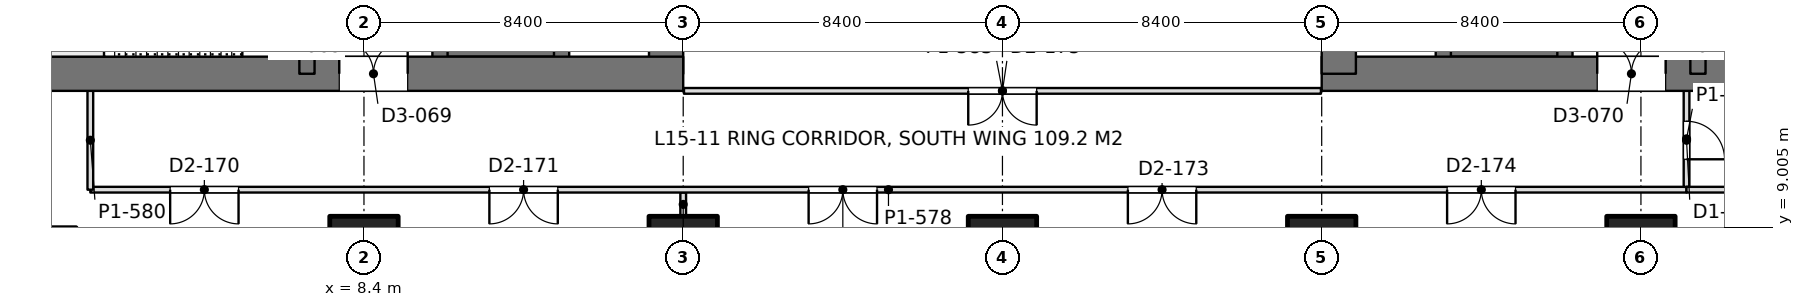
"""IFC4 building model, lengths in metres.
Left out: names, types, materials, properties, quantities, classifications, styles, units other than length and angle.
Written with IfcOpenShell. Run it as: python <this file> out.ifc"""

import sys

from ifc_helpers import new_model, si_unit, direction, frame, frame_2d, origin, origin_2d, place, context, subcontext, project, spatial, rectangle, extrude, element, fill, save


model = new_model("IFC4")
c1 = context("Model", 3, precision=1e-05, world=origin(), true_north=direction((0.0, 1.0)))
c2 = subcontext(c1, "Body", "Model", "MODEL_VIEW")
j1 = project(units=[si_unit("LENGTHUNIT", "METRE"), si_unit("PLANEANGLEUNIT", "RADIAN")], contexts=[c1])
p1 = place(None, origin())
s1 = spatial("IfcSite", under=j1, at=p1, CompositionType="ELEMENT")
p2 = place(p1, origin())
s2 = spatial("IfcBuilding", under=s1, at=p2, CompositionType="ELEMENT")
p3 = place(p2, frame((0.0, 0.0, 68.4)))
s3 = spatial("IfcBuildingStorey", under=s2, at=p3, CompositionType="ELEMENT", Elevation=68.4)
for number, where, z_axis, x_axis in (
    (1, (8.4, 8.4, 0.0), (0.0, 0.0, 1.0), (1.0, 0.0, 0.0)),
    (2, (16.8, 8.4, 0.0), (0.0, 0.0, 1.0), (1.0, 0.0, 0.0)),
    (3, (25.2, 8.4, 0.0), (0.0, 0.0, 1.0), (1.0, 0.0, 0.0)),
    (4, (33.6, 8.4, 0.0), (0.0, 0.0, 1.0), (1.0, 0.0, 0.0)),
    (5, (42.0, 8.4, 0.0), (0.0, 0.0, 1.0), (1.0, 0.0, 0.0)),
):
    element("IfcColumn", number, at=place(p3, frame(where, z_axis=z_axis, x_axis=x_axis)), inside=s3, PredefinedType="COLUMN", context=c2, shape_type="SweptSolid", body=[
        extrude(rectangle(XDim=1.8, YDim=1.8, at=origin_2d()), origin(), (0.0, 0.0, 1.0), 4.5),
    ])
p4 = place(p3, frame((-1.2, 13.05, 0.0), z_axis=(0.0, 0.0, 1.0), x_axis=(1.0, 0.0, 0.0)))
e6 = element("IfcWall", 6, at=p4, inside=s3, PredefinedType="SHEAR", context=c2, shape_type="SweptSolid", body=[
    extrude(rectangle(XDim=18.0, YDim=0.9, at=frame_2d((9.0, 0.0))), origin(), (0.0, 0.0, 1.0), 4.5),
])
p5 = place(p4, frame((8.95, 0.0, 0.0)))
e7 = element("IfcOpeningElement", 7, at=p5, cuts=e6, PredefinedType="OPENING", context=c2, shape_type="SweptSolid", body=[
    extrude(rectangle(XDim=1.8, YDim=2.4, at=frame_2d((0.9, 1.2))), frame((0.0, 0.46, 0.0), z_axis=(0.0, -1.0, 0.0), x_axis=(1.0, 0.0, 0.0)), (0.0, 0.0, 1.0), 0.92),
])
p6 = place(p3, frame((16.35, 13.05, 0.0), z_axis=(0.0, 0.0, 1.0), x_axis=(0.0, 1.0, 0.0)))
e8 = element("IfcWall", 8, at=p6, inside=s3, PredefinedType="SHEAR", context=c2, shape_type="SweptSolid", body=[
    extrude(rectangle(XDim=24.3, YDim=0.9, at=frame_2d((12.15, 0.0))), origin(), (0.0, 0.0, 1.0), 4.5),
])
p7 = place(p3, frame((6.9, 13.05, 0.0), z_axis=(0.0, 0.0, 1.0), x_axis=(0.0, 1.0, 0.0)))
e9 = element("IfcWall", 9, at=p7, inside=s3, PredefinedType="SHEAR", context=c2, shape_type="SweptSolid", body=[
    extrude(rectangle(XDim=24.3, YDim=0.4, at=frame_2d((12.15, 0.0))), origin(), (0.0, 0.0, 1.0), 4.5),
])
p8 = place(p7, frame((1.3, 0.0, 0.0)))
e10 = element("IfcOpeningElement", 10, at=p8, cuts=e9, PredefinedType="OPENING", context=c2, shape_type="SweptSolid", body=[
    extrude(rectangle(XDim=1.0, YDim=2.2, at=frame_2d((0.5, 1.1))), frame((0.0, 0.21, 0.0), z_axis=(0.0, -1.0, 0.0), x_axis=(1.0, 0.0, 0.0)), (0.0, 0.0, 1.0), 0.42),
])
p9 = place(p7, frame((22.0, 0.0, 0.0)))
e11 = element("IfcOpeningElement", 11, at=p9, cuts=e9, PredefinedType="OPENING", context=c2, shape_type="SweptSolid", body=[
    extrude(rectangle(XDim=1.0, YDim=2.2, at=frame_2d((0.5, 1.1))), frame((0.0, 0.21, 0.0), z_axis=(0.0, -1.0, 0.0), x_axis=(1.0, 0.0, 0.0)), (0.0, 0.0, 1.0), 0.42),
])
p10 = place(p7, frame((5.55, 0.0, 0.0)))
e12 = element("IfcOpeningElement", 12, at=p10, cuts=e9, PredefinedType="OPENING", context=c2, shape_type="SweptSolid", body=[
    extrude(rectangle(XDim=1.0, YDim=2.2, at=frame_2d((0.5, 1.1))), frame((0.0, 0.21, 0.0), z_axis=(0.0, -1.0, 0.0), x_axis=(1.0, 0.0, 0.0)), (0.0, 0.0, 1.0), 0.42),
])
p11 = place(p7, frame((9.55, 0.0, 0.0)))
e13 = element("IfcOpeningElement", 13, at=p11, cuts=e9, PredefinedType="OPENING", context=c2, shape_type="SweptSolid", body=[
    extrude(rectangle(XDim=1.0, YDim=2.2, at=frame_2d((0.5, 1.1))), frame((0.0, 0.21, 0.0), z_axis=(0.0, -1.0, 0.0), x_axis=(1.0, 0.0, 0.0)), (0.0, 0.0, 1.0), 0.42),
])
p12 = place(p7, frame((12.8, 0.0, 0.0)))
e14 = element("IfcOpeningElement", 14, at=p12, cuts=e9, PredefinedType="OPENING", context=c2, shape_type="SweptSolid", body=[
    extrude(rectangle(XDim=1.1, YDim=2.2, at=frame_2d((0.55, 1.1))), frame((0.0, 0.21, 0.0), z_axis=(0.0, -1.0, 0.0), x_axis=(1.0, 0.0, 0.0)), (0.0, 0.0, 1.0), 0.42),
])
p13 = place(p7, frame((15.538, 0.0, 0.0)))
e15 = element("IfcOpeningElement", 15, at=p13, cuts=e9, PredefinedType="OPENING", context=c2, shape_type="SweptSolid", body=[
    extrude(rectangle(XDim=1.1, YDim=2.2, at=frame_2d((0.55, 1.1))), frame((0.0, 0.21, 0.0), z_axis=(0.0, -1.0, 0.0), x_axis=(1.0, 0.0, 0.0)), (0.0, 0.0, 1.0), 0.42),
])
p14 = place(p7, frame((18.262, 0.0, 0.0)))
e16 = element("IfcOpeningElement", 16, at=p14, cuts=e9, PredefinedType="OPENING", context=c2, shape_type="SweptSolid", body=[
    extrude(rectangle(XDim=1.1, YDim=2.2, at=frame_2d((0.55, 1.1))), frame((0.0, 0.21, 0.0), z_axis=(0.0, -1.0, 0.0), x_axis=(1.0, 0.0, 0.0)), (0.0, 0.0, 1.0), 0.42),
])
p15 = place(p3, frame((10.4, 13.05, 0.0), z_axis=(0.0, 0.0, 1.0), x_axis=(0.0, 1.0, 0.0)))
e17 = element("IfcWall", 17, at=p15, inside=s3, PredefinedType="SHEAR", context=c2, shape_type="SweptSolid", body=[
    extrude(rectangle(XDim=24.3, YDim=0.4, at=frame_2d((12.15, 0.0))), origin(), (0.0, 0.0, 1.0), 4.5),
])
p16 = place(p15, frame((1.5, 0.0, 0.0)))
e18 = element("IfcOpeningElement", 18, at=p16, cuts=e17, PredefinedType="OPENING", context=c2, shape_type="SweptSolid", body=[
    extrude(rectangle(XDim=1.1, YDim=2.2, at=frame_2d((0.55, 1.1))), frame((0.0, 0.21, 0.0), z_axis=(0.0, -1.0, 0.0), x_axis=(1.0, 0.0, 0.0)), (0.0, 0.0, 1.0), 0.42),
])
p17 = place(p15, frame((4.35, 0.0, 0.0)))
e19 = element("IfcOpeningElement", 19, at=p17, cuts=e17, PredefinedType="OPENING", context=c2, shape_type="SweptSolid", body=[
    extrude(rectangle(XDim=1.1, YDim=2.2, at=frame_2d((0.55, 1.1))), frame((0.0, 0.21, 0.0), z_axis=(0.0, -1.0, 0.0), x_axis=(1.0, 0.0, 0.0)), (0.0, 0.0, 1.0), 0.42),
])
p18 = place(p15, frame((7.2, 0.0, 0.0)))
e20 = element("IfcOpeningElement", 20, at=p18, cuts=e17, PredefinedType="OPENING", context=c2, shape_type="SweptSolid", body=[
    extrude(rectangle(XDim=1.1, YDim=2.2, at=frame_2d((0.55, 1.1))), frame((0.0, 0.21, 0.0), z_axis=(0.0, -1.0, 0.0), x_axis=(1.0, 0.0, 0.0)), (0.0, 0.0, 1.0), 0.42),
])
p19 = place(p15, frame((21.45, 0.0, 0.0)))
e21 = element("IfcOpeningElement", 21, at=p19, cuts=e17, PredefinedType="OPENING", context=c2, shape_type="SweptSolid", body=[
    extrude(rectangle(XDim=1.1, YDim=2.2, at=frame_2d((0.55, 1.1))), frame((0.0, 0.21, 0.0), z_axis=(0.0, -1.0, 0.0), x_axis=(1.0, 0.0, 0.0)), (0.0, 0.0, 1.0), 0.42),
])
p20 = place(p3, frame((13.6, 13.05, 0.0), z_axis=(0.0, 0.0, 1.0), x_axis=(0.0, 1.0, 0.0)))
e22 = element("IfcWall", 22, at=p20, inside=s3, PredefinedType="SHEAR", context=c2, shape_type="SweptSolid", body=[
    extrude(rectangle(XDim=24.3, YDim=0.4, at=frame_2d((12.15, 0.0))), origin(), (0.0, 0.0, 1.0), 4.5),
])
p21 = place(p3, frame((10.4, 13.65, 0.0), z_axis=(0.0, 0.0, 1.0), x_axis=(1.0, 0.0, 0.0)))
e23 = element("IfcWall", 23, at=p21, inside=s3, PredefinedType="SHEAR", context=c2, shape_type="SweptSolid", body=[
    extrude(rectangle(XDim=3.2, YDim=0.3, at=frame_2d((1.6, 0.0))), origin(), (0.0, 0.0, 1.0), 4.5),
])
p22 = place(p3, frame((33.6, 13.05, 0.0), z_axis=(0.0, 0.0, 1.0), x_axis=(1.0, 0.0, 0.0)))
e24 = element("IfcWall", 24, at=p22, inside=s3, PredefinedType="SHEAR", context=c2, shape_type="SweptSolid", body=[
    extrude(rectangle(XDim=18.0, YDim=0.9, at=frame_2d((9.0, 0.0))), origin(), (0.0, 0.0, 1.0), 4.5),
])
p23 = place(p22, frame((7.25, 0.0, 0.0)))
e25 = element("IfcOpeningElement", 25, at=p23, cuts=e24, PredefinedType="OPENING", context=c2, shape_type="SweptSolid", body=[
    extrude(rectangle(XDim=1.8, YDim=2.4, at=frame_2d((0.9, 1.2))), frame((0.0, 0.46, 0.0), z_axis=(0.0, -1.0, 0.0), x_axis=(1.0, 0.0, 0.0)), (0.0, 0.0, 1.0), 0.92),
])
p24 = place(p3, frame((34.05, 13.05, 0.0), z_axis=(0.0, 0.0, 1.0), x_axis=(0.0, 1.0, 0.0)))
e26 = element("IfcWall", 26, at=p24, inside=s3, PredefinedType="SHEAR", context=c2, shape_type="SweptSolid", body=[
    extrude(rectangle(XDim=24.3, YDim=0.9, at=frame_2d((12.15, 0.0))), origin(), (0.0, 0.0, 1.0), 4.5),
])
p25 = place(p3, frame((43.5, 13.05, 0.0), z_axis=(0.0, 0.0, 1.0), x_axis=(0.0, 1.0, 0.0)))
e27 = element("IfcWall", 27, at=p25, inside=s3, PredefinedType="SHEAR", context=c2, shape_type="SweptSolid", body=[
    extrude(rectangle(XDim=24.3, YDim=0.4, at=frame_2d((12.15, 0.0))), origin(), (0.0, 0.0, 1.0), 4.5),
])
p26 = place(p25, frame((1.3, 0.0, 0.0)))
e28 = element("IfcOpeningElement", 28, at=p26, cuts=e27, PredefinedType="OPENING", context=c2, shape_type="SweptSolid", body=[
    extrude(rectangle(XDim=1.0, YDim=2.2, at=frame_2d((0.5, 1.1))), frame((0.0, 0.21, 0.0), z_axis=(0.0, -1.0, 0.0), x_axis=(1.0, 0.0, 0.0)), (0.0, 0.0, 1.0), 0.42),
])
p27 = place(p25, frame((22.0, 0.0, 0.0)))
e29 = element("IfcOpeningElement", 29, at=p27, cuts=e27, PredefinedType="OPENING", context=c2, shape_type="SweptSolid", body=[
    extrude(rectangle(XDim=1.0, YDim=2.2, at=frame_2d((0.5, 1.1))), frame((0.0, 0.21, 0.0), z_axis=(0.0, -1.0, 0.0), x_axis=(1.0, 0.0, 0.0)), (0.0, 0.0, 1.0), 0.42),
])
p28 = place(p25, frame((5.55, 0.0, 0.0)))
e30 = element("IfcOpeningElement", 30, at=p28, cuts=e27, PredefinedType="OPENING", context=c2, shape_type="SweptSolid", body=[
    extrude(rectangle(XDim=1.0, YDim=2.2, at=frame_2d((0.5, 1.1))), frame((0.0, 0.21, 0.0), z_axis=(0.0, -1.0, 0.0), x_axis=(1.0, 0.0, 0.0)), (0.0, 0.0, 1.0), 0.42),
])
p29 = place(p25, frame((9.55, 0.0, 0.0)))
e31 = element("IfcOpeningElement", 31, at=p29, cuts=e27, PredefinedType="OPENING", context=c2, shape_type="SweptSolid", body=[
    extrude(rectangle(XDim=1.0, YDim=2.2, at=frame_2d((0.5, 1.1))), frame((0.0, 0.21, 0.0), z_axis=(0.0, -1.0, 0.0), x_axis=(1.0, 0.0, 0.0)), (0.0, 0.0, 1.0), 0.42),
])
p30 = place(p25, frame((12.8, 0.0, 0.0)))
e32 = element("IfcOpeningElement", 32, at=p30, cuts=e27, PredefinedType="OPENING", context=c2, shape_type="SweptSolid", body=[
    extrude(rectangle(XDim=1.1, YDim=2.2, at=frame_2d((0.55, 1.1))), frame((0.0, 0.21, 0.0), z_axis=(0.0, -1.0, 0.0), x_axis=(1.0, 0.0, 0.0)), (0.0, 0.0, 1.0), 0.42),
])
p31 = place(p25, frame((15.538, 0.0, 0.0)))
e33 = element("IfcOpeningElement", 33, at=p31, cuts=e27, PredefinedType="OPENING", context=c2, shape_type="SweptSolid", body=[
    extrude(rectangle(XDim=1.1, YDim=2.2, at=frame_2d((0.55, 1.1))), frame((0.0, 0.21, 0.0), z_axis=(0.0, -1.0, 0.0), x_axis=(1.0, 0.0, 0.0)), (0.0, 0.0, 1.0), 0.42),
])
p32 = place(p25, frame((18.262, 0.0, 0.0)))
e34 = element("IfcOpeningElement", 34, at=p32, cuts=e27, PredefinedType="OPENING", context=c2, shape_type="SweptSolid", body=[
    extrude(rectangle(XDim=1.1, YDim=2.2, at=frame_2d((0.55, 1.1))), frame((0.0, 0.21, 0.0), z_axis=(0.0, -1.0, 0.0), x_axis=(1.0, 0.0, 0.0)), (0.0, 0.0, 1.0), 0.42),
])
p33 = place(p3, frame((40.0, 13.05, 0.0), z_axis=(0.0, 0.0, 1.0), x_axis=(0.0, 1.0, 0.0)))
e35 = element("IfcWall", 35, at=p33, inside=s3, PredefinedType="SHEAR", context=c2, shape_type="SweptSolid", body=[
    extrude(rectangle(XDim=24.3, YDim=0.4, at=frame_2d((12.15, 0.0))), origin(), (0.0, 0.0, 1.0), 4.5),
])
p34 = place(p33, frame((1.5, 0.0, 0.0)))
e36 = element("IfcOpeningElement", 36, at=p34, cuts=e35, PredefinedType="OPENING", context=c2, shape_type="SweptSolid", body=[
    extrude(rectangle(XDim=1.1, YDim=2.2, at=frame_2d((0.55, 1.1))), frame((0.0, 0.21, 0.0), z_axis=(0.0, -1.0, 0.0), x_axis=(1.0, 0.0, 0.0)), (0.0, 0.0, 1.0), 0.42),
])
p35 = place(p33, frame((4.35, 0.0, 0.0)))
e37 = element("IfcOpeningElement", 37, at=p35, cuts=e35, PredefinedType="OPENING", context=c2, shape_type="SweptSolid", body=[
    extrude(rectangle(XDim=1.1, YDim=2.2, at=frame_2d((0.55, 1.1))), frame((0.0, 0.21, 0.0), z_axis=(0.0, -1.0, 0.0), x_axis=(1.0, 0.0, 0.0)), (0.0, 0.0, 1.0), 0.42),
])
p36 = place(p33, frame((7.2, 0.0, 0.0)))
e38 = element("IfcOpeningElement", 38, at=p36, cuts=e35, PredefinedType="OPENING", context=c2, shape_type="SweptSolid", body=[
    extrude(rectangle(XDim=1.1, YDim=2.2, at=frame_2d((0.55, 1.1))), frame((0.0, 0.21, 0.0), z_axis=(0.0, -1.0, 0.0), x_axis=(1.0, 0.0, 0.0)), (0.0, 0.0, 1.0), 0.42),
])
p37 = place(p33, frame((21.45, 0.0, 0.0)))
e39 = element("IfcOpeningElement", 39, at=p37, cuts=e35, PredefinedType="OPENING", context=c2, shape_type="SweptSolid", body=[
    extrude(rectangle(XDim=1.1, YDim=2.2, at=frame_2d((0.55, 1.1))), frame((0.0, 0.21, 0.0), z_axis=(0.0, -1.0, 0.0), x_axis=(1.0, 0.0, 0.0)), (0.0, 0.0, 1.0), 0.42),
])
p38 = place(p3, frame((36.8, 13.05, 0.0), z_axis=(0.0, 0.0, 1.0), x_axis=(0.0, 1.0, 0.0)))
e40 = element("IfcWall", 40, at=p38, inside=s3, PredefinedType="SHEAR", context=c2, shape_type="SweptSolid", body=[
    extrude(rectangle(XDim=24.3, YDim=0.4, at=frame_2d((12.15, 0.0))), origin(), (0.0, 0.0, 1.0), 4.5),
])
p39 = place(p3, frame((40.0, 13.65, 0.0), z_axis=(0.0, 0.0, 1.0), x_axis=(-1.0, 0.0, 0.0)))
e41 = element("IfcWall", 41, at=p39, inside=s3, PredefinedType="SHEAR", context=c2, shape_type="SweptSolid", body=[
    extrude(rectangle(XDim=3.2, YDim=0.3, at=frame_2d((1.6, 0.0))), origin(), (0.0, 0.0, 1.0), 4.5),
])
p40 = place(p3, frame((16.8, 9.299, 0.0), z_axis=(0.0, 0.0, 1.0), x_axis=(0.0, 1.0, 0.0)))
e42 = element("IfcWall", 42, at=p40, inside=s3, PredefinedType="PARTITIONING", context=c2, shape_type="SweptSolid", body=[
    extrude(rectangle(XDim=0.627, YDim=0.15, at=frame_2d((0.313, 0.0))), origin(), (0.0, 0.0, 1.0), 3.98),
])
p41 = place(p3, frame((1.2, 10.0, 0.0), z_axis=(0.0, 0.0, 1.0), x_axis=(1.0, 0.0, 0.0)))
e43 = element("IfcWall", 43, at=p41, inside=s3, PredefinedType="PARTITIONING", context=c2, shape_type="SweptSolid", body=[
    extrude(rectangle(XDim=42.002, YDim=0.15, at=frame_2d((21.001, 0.0))), origin(), (0.0, 0.0, 1.0), 3.74),
])
p42 = place(p41, frame((2.1, 0.0, 0.0)))
e44 = element("IfcOpeningElement", 44, at=p42, cuts=e43, PredefinedType="OPENING", context=c2, shape_type="SweptSolid", body=[
    extrude(rectangle(XDim=1.8, YDim=2.2, at=frame_2d((0.9, 1.1))), frame((0.0, 0.085, 0.0), z_axis=(0.0, -1.0, 0.0), x_axis=(1.0, 0.0, 0.0)), (0.0, 0.0, 1.0), 0.17),
])
p43 = place(p41, frame((10.5, 0.0, 0.0)))
e45 = element("IfcOpeningElement", 45, at=p43, cuts=e43, PredefinedType="OPENING", context=c2, shape_type="SweptSolid", body=[
    extrude(rectangle(XDim=1.8, YDim=2.2, at=frame_2d((0.9, 1.1))), frame((0.0, 0.085, 0.0), z_axis=(0.0, -1.0, 0.0), x_axis=(1.0, 0.0, 0.0)), (0.0, 0.0, 1.0), 0.17),
])
p44 = place(p41, frame((18.9, 0.0, 0.0)))
e46 = element("IfcOpeningElement", 46, at=p44, cuts=e43, PredefinedType="OPENING", context=c2, shape_type="SweptSolid", body=[
    extrude(rectangle(XDim=1.8, YDim=2.2, at=frame_2d((0.9, 1.1))), frame((0.0, 0.085, 0.0), z_axis=(0.0, -1.0, 0.0), x_axis=(1.0, 0.0, 0.0)), (0.0, 0.0, 1.0), 0.17),
])
p45 = place(p41, frame((27.3, 0.0, 0.0)))
e47 = element("IfcOpeningElement", 47, at=p45, cuts=e43, PredefinedType="OPENING", context=c2, shape_type="SweptSolid", body=[
    extrude(rectangle(XDim=1.8, YDim=2.2, at=frame_2d((0.9, 1.1))), frame((0.0, 0.085, 0.0), z_axis=(0.0, -1.0, 0.0), x_axis=(1.0, 0.0, 0.0)), (0.0, 0.0, 1.0), 0.17),
])
p46 = place(p41, frame((35.7, 0.0, 0.0)))
e48 = element("IfcOpeningElement", 48, at=p46, cuts=e43, PredefinedType="OPENING", context=c2, shape_type="SweptSolid", body=[
    extrude(rectangle(XDim=1.8, YDim=2.2, at=frame_2d((0.9, 1.1))), frame((0.0, 0.085, 0.0), z_axis=(0.0, -1.0, 0.0), x_axis=(1.0, 0.0, 0.0)), (0.0, 0.0, 1.0), 0.17),
])
p47 = place(p3, frame((1.2, 10.0, 0.0), z_axis=(0.0, 0.0, 1.0), x_axis=(0.0, 1.0, 0.0)))
e49 = element("IfcWall", 49, at=p47, inside=s3, PredefinedType="PARTITIONING", context=c2, shape_type="SweptSolid", body=[
    extrude(rectangle(XDim=2.602, YDim=0.15, at=frame_2d((1.301, 0.0))), origin(), (0.0, 0.0, 1.0), 4.34),
])
p48 = place(p3, frame((43.2, 10.074, 0.0), z_axis=(0.0, 0.0, 1.0), x_axis=(0.0, 1.0, 0.0)))
e50 = element("IfcWall", 50, at=p48, inside=s3, PredefinedType="PARTITIONING", context=c2, shape_type="SweptSolid", body=[
    extrude(rectangle(XDim=2.528, YDim=0.15, at=frame_2d((1.264, 0.0))), origin(), (0.0, 0.0, 1.0), 4.34),
])
p49 = place(p48, frame((0.726, 0.0, 0.0)))
e51 = element("IfcOpeningElement", 51, at=p49, cuts=e50, PredefinedType="OPENING", context=c2, shape_type="SweptSolid", body=[
    extrude(rectangle(XDim=1.0, YDim=2.2, at=frame_2d((0.5, 1.1))), frame((0.0, 0.085, 0.0), z_axis=(0.0, -1.0, 0.0), x_axis=(1.0, 0.0, 0.0)), (0.0, 0.0, 1.0), 0.17),
])
p50 = place(p3, frame((43.198, 10.0, 0.0), z_axis=(0.0, 0.0, 1.0), x_axis=(1.0, 0.0, 0.0)))
e52 = element("IfcWall", 52, at=p50, inside=s3, PredefinedType="PARTITIONING", context=c2, shape_type="SweptSolid", body=[
    extrude(rectangle(XDim=6.002, YDim=0.15, at=frame_2d((3.001, 0.0))), origin(), (0.0, 0.0, 1.0), 4.34),
])
p51 = place(p3, frame((16.82, 12.6, 0.0), z_axis=(0.0, 0.0, 1.0), x_axis=(1.0, 0.0, 0.0)))
e53 = element("IfcWall", 53, at=p51, inside=s3, PredefinedType="PARTITIONING", context=c2, shape_type="SweptSolid", body=[
    extrude(rectangle(XDim=16.76, YDim=0.15, at=frame_2d((8.38, 0.0))), origin(), (0.0, 0.0, 1.0), 3.74),
])
p52 = place(p51, frame((7.48, 0.0, 0.0)))
e54 = element("IfcOpeningElement", 54, at=p52, cuts=e53, PredefinedType="OPENING", context=c2, shape_type="SweptSolid", body=[
    extrude(rectangle(XDim=1.8, YDim=2.2, at=frame_2d((0.9, 1.1))), frame((0.0, 0.085, 0.0), z_axis=(0.0, -1.0, 0.0), x_axis=(1.0, 0.0, 0.0)), (0.0, 0.0, 1.0), 0.17),
])
p53 = place(p5, origin())
e55 = element("IfcDoor", 55, at=p53, inside=s3, OperationType="DOUBLE_DOOR_SINGLE_SWING", PredefinedType="DOOR", context=c2, shape_type="SweptSolid", body=[
    extrude(rectangle(XDim=1.8, YDim=2.4, at=frame_2d((0.9, 1.2))), frame((0.0, 0.025, 0.0), z_axis=(0.0, -1.0, 0.0), x_axis=(1.0, 0.0, 0.0)), (0.0, 0.0, 1.0), 0.05),
])
fill(e7, e55)
p54 = place(p23, origin())
e56 = element("IfcDoor", 56, at=p54, inside=s3, OperationType="DOUBLE_DOOR_SINGLE_SWING", PredefinedType="DOOR", context=c2, shape_type="SweptSolid", body=[
    extrude(rectangle(XDim=1.8, YDim=2.4, at=frame_2d((0.9, 1.2))), frame((0.0, 0.025, 0.0), z_axis=(0.0, -1.0, 0.0), x_axis=(1.0, 0.0, 0.0)), (0.0, 0.0, 1.0), 0.05),
])
fill(e25, e56)
p55 = place(p42, frame((1.8, 0.0, 0.0), z_axis=(0.0, 0.0, 1.0), x_axis=(-1.0, 0.0, 0.0)))
e57 = element("IfcDoor", 57, at=p55, inside=s3, OperationType="DOUBLE_DOOR_SINGLE_SWING", PredefinedType="DOOR", context=c2, shape_type="SweptSolid", body=[
    extrude(rectangle(XDim=1.8, YDim=2.2, at=frame_2d((0.9, 1.1))), frame((0.0, 0.025, 0.0), z_axis=(0.0, -1.0, 0.0), x_axis=(1.0, 0.0, 0.0)), (0.0, 0.0, 1.0), 0.05),
])
fill(e44, e57)
p56 = place(p43, frame((1.8, 0.0, 0.0), z_axis=(0.0, 0.0, 1.0), x_axis=(-1.0, 0.0, 0.0)))
e58 = element("IfcDoor", 58, at=p56, inside=s3, OperationType="DOUBLE_DOOR_SINGLE_SWING", PredefinedType="DOOR", context=c2, shape_type="SweptSolid", body=[
    extrude(rectangle(XDim=1.8, YDim=2.2, at=frame_2d((0.9, 1.1))), frame((0.0, 0.025, 0.0), z_axis=(0.0, -1.0, 0.0), x_axis=(1.0, 0.0, 0.0)), (0.0, 0.0, 1.0), 0.05),
])
fill(e45, e58)
p57 = place(p44, frame((1.8, 0.0, 0.0), z_axis=(0.0, 0.0, 1.0), x_axis=(-1.0, 0.0, 0.0)))
e59 = element("IfcDoor", 59, at=p57, inside=s3, OperationType="DOUBLE_DOOR_SINGLE_SWING", PredefinedType="DOOR", context=c2, shape_type="SweptSolid", body=[
    extrude(rectangle(XDim=1.8, YDim=2.2, at=frame_2d((0.9, 1.1))), frame((0.0, 0.025, 0.0), z_axis=(0.0, -1.0, 0.0), x_axis=(1.0, 0.0, 0.0)), (0.0, 0.0, 1.0), 0.05),
])
fill(e46, e59)
p58 = place(p45, frame((1.8, 0.0, 0.0), z_axis=(0.0, 0.0, 1.0), x_axis=(-1.0, 0.0, 0.0)))
e60 = element("IfcDoor", 60, at=p58, inside=s3, OperationType="DOUBLE_DOOR_SINGLE_SWING", PredefinedType="DOOR", context=c2, shape_type="SweptSolid", body=[
    extrude(rectangle(XDim=1.8, YDim=2.2, at=frame_2d((0.9, 1.1))), frame((0.0, 0.025, 0.0), z_axis=(0.0, -1.0, 0.0), x_axis=(1.0, 0.0, 0.0)), (0.0, 0.0, 1.0), 0.05),
])
fill(e47, e60)
p59 = place(p46, frame((1.8, 0.0, 0.0), z_axis=(0.0, 0.0, 1.0), x_axis=(-1.0, 0.0, 0.0)))
e61 = element("IfcDoor", 61, at=p59, inside=s3, OperationType="DOUBLE_DOOR_SINGLE_SWING", PredefinedType="DOOR", context=c2, shape_type="SweptSolid", body=[
    extrude(rectangle(XDim=1.8, YDim=2.2, at=frame_2d((0.9, 1.1))), frame((0.0, 0.025, 0.0), z_axis=(0.0, -1.0, 0.0), x_axis=(1.0, 0.0, 0.0)), (0.0, 0.0, 1.0), 0.05),
])
fill(e48, e61)
p60 = place(p49, frame((1.0, 0.0, 0.0), z_axis=(0.0, 0.0, 1.0), x_axis=(-1.0, 0.0, 0.0)))
e62 = element("IfcDoor", 62, at=p60, inside=s3, OperationType="SINGLE_SWING_RIGHT", PredefinedType="DOOR", context=c2, shape_type="SweptSolid", body=[
    extrude(rectangle(XDim=1.0, YDim=2.2, at=frame_2d((0.5, 1.1))), frame((0.0, 0.025, 0.0), z_axis=(0.0, -1.0, 0.0), x_axis=(1.0, 0.0, 0.0)), (0.0, 0.0, 1.0), 0.05),
])
fill(e51, e62)
p61 = place(p52, frame((1.8, 0.0, 0.0), z_axis=(0.0, 0.0, 1.0), x_axis=(-1.0, 0.0, 0.0)))
e63 = element("IfcDoor", 63, at=p61, inside=s3, OperationType="DOUBLE_DOOR_SINGLE_SWING", PredefinedType="DOOR", context=c2, shape_type="SweptSolid", body=[
    extrude(rectangle(XDim=1.8, YDim=2.2, at=frame_2d((0.9, 1.1))), frame((0.0, 0.025, 0.0), z_axis=(0.0, -1.0, 0.0), x_axis=(1.0, 0.0, 0.0)), (0.0, 0.0, 1.0), 0.05),
])
fill(e54, e63)
save(model, sys.argv[1])
